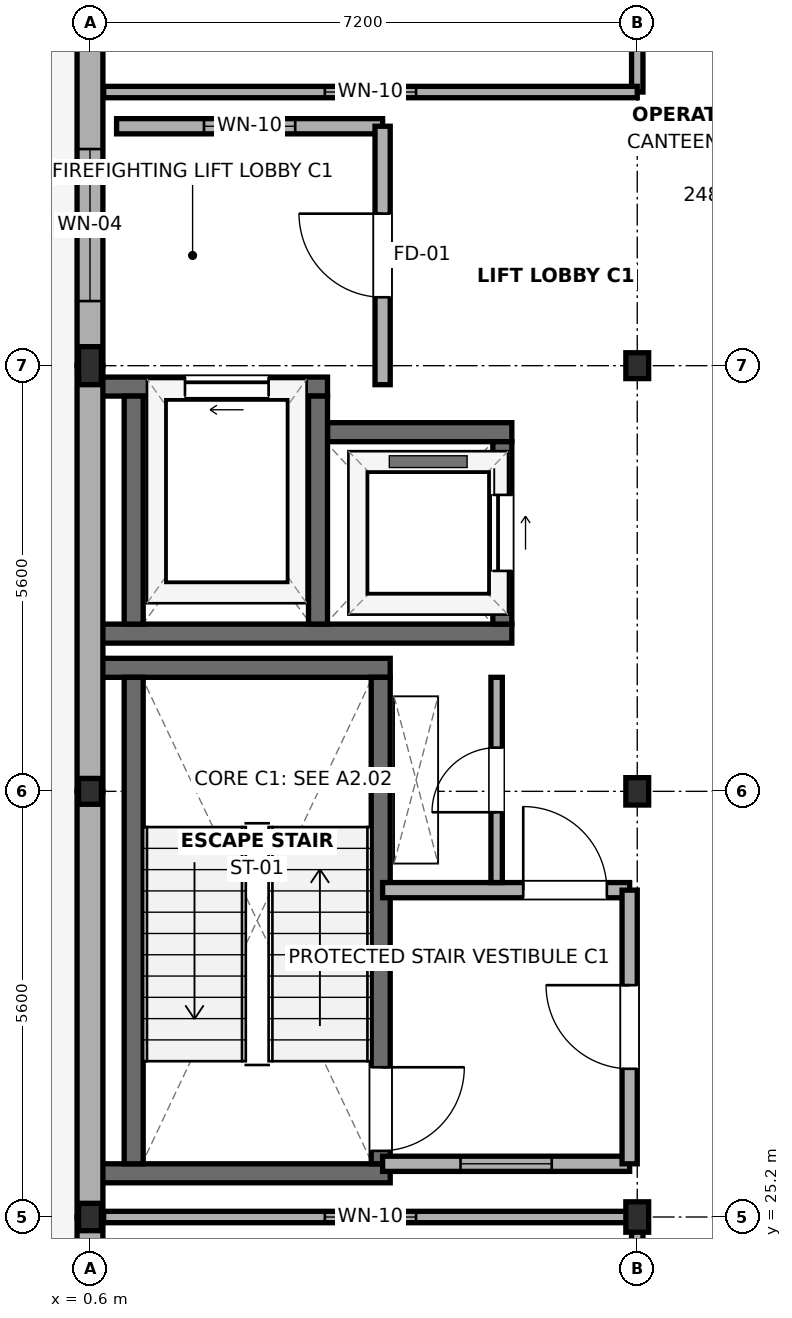
"""IFC4 building model, lengths in metres.
Left out: names, types, materials, properties, quantities, classifications, styles, units other than length and angle.
Written with IfcOpenShell. Run it as: python <this file> out.ifc"""

import sys

from ifc_helpers import new_model, si_unit, direction, frame, frame_2d, origin, origin_2d, place, context, subcontext, project, spatial, rectangle, i_section, extrude, element, fill, save


model = new_model("IFC4")
c1 = context("Model", 3, precision=1e-05, world=origin(), true_north=direction((0.0, 1.0)))
c2 = subcontext(c1, "Body", "Model", "MODEL_VIEW")
j1 = project(units=[si_unit("LENGTHUNIT", "METRE"), si_unit("PLANEANGLEUNIT", "RADIAN")], contexts=[c1])
p1 = place(None, origin())
s1 = spatial("IfcSite", under=j1, at=p1, CompositionType="ELEMENT")
p2 = place(p1, origin())
s2 = spatial("IfcBuilding", under=s1, at=p2, CompositionType="ELEMENT")
p3 = place(p2, frame((0.0, 0.0, 17.1)))
s3 = spatial("IfcBuildingStorey", under=s2, at=p3, CompositionType="ELEMENT", Elevation=17.1)
p4 = place(p3, frame((0.6, 25.2, 0.0), z_axis=(0.0, 0.0, 1.0), x_axis=(1.0, 0.0, 0.0)))
e1 = element("IfcColumn", 1, at=p4, inside=s3, PredefinedType="COLUMN", context=c2, shape_type="SweptSolid", body=[
    extrude(i_section(OverallWidth=0.3, OverallDepth=0.36, WebThickness=0.012, FlangeThickness=0.022, FilletRadius=0.027, at=origin_2d()), origin(), (0.0, 0.0, 1.0), 3.9),
])
p5 = place(p3, frame((0.6, 30.8, 0.0), z_axis=(0.0, 0.0, 1.0), x_axis=(1.0, 0.0, 0.0)))
e2 = element("IfcColumn", 2, at=p5, inside=s3, PredefinedType="COLUMN", context=c2, shape_type="SweptSolid", body=[
    extrude(i_section(OverallWidth=0.3, OverallDepth=0.34, WebThickness=0.012, FlangeThickness=0.021, FilletRadius=0.027, at=origin_2d()), origin(), (0.0, 0.0, 1.0), 3.9),
])
p6 = place(p3, frame((0.6, 36.4, 0.0), z_axis=(0.0, 0.0, 1.0), x_axis=(1.0, 0.0, 0.0)))
e3 = element("IfcColumn", 3, at=p6, inside=s3, PredefinedType="COLUMN", context=c2, shape_type="SweptSolid", body=[
    extrude(i_section(OverallWidth=0.3, OverallDepth=0.5, WebThickness=0.014, FlangeThickness=0.028, FilletRadius=0.027, at=origin_2d()), origin(), (0.0, 0.0, 1.0), 3.9),
])
p7 = place(p3, frame((7.8, 25.2, 0.0), z_axis=(0.0, 0.0, 1.0), x_axis=(1.0, 0.0, 0.0)))
e4 = element("IfcColumn", 4, at=p7, inside=s3, PredefinedType="COLUMN", context=c2, shape_type="SweptSolid", body=[
    extrude(i_section(OverallWidth=0.3, OverallDepth=0.4, WebThickness=0.013, FlangeThickness=0.024, FilletRadius=0.027, at=origin_2d()), origin(), (0.0, 0.0, 1.0), 3.9),
])
p8 = place(p3, frame((7.8, 30.8, 0.0), z_axis=(0.0, 0.0, 1.0), x_axis=(1.0, 0.0, 0.0)))
e5 = element("IfcColumn", 5, at=p8, inside=s3, PredefinedType="COLUMN", context=c2, shape_type="SweptSolid", body=[
    extrude(i_section(OverallWidth=0.3, OverallDepth=0.36, WebThickness=0.012, FlangeThickness=0.022, FilletRadius=0.027, at=origin_2d()), origin(), (0.0, 0.0, 1.0), 3.9),
])
p9 = place(p3, frame((7.8, 36.4, 0.0), z_axis=(0.0, 0.0, 1.0), x_axis=(1.0, 0.0, 0.0)))
e6 = element("IfcColumn", 6, at=p9, inside=s3, PredefinedType="COLUMN", context=c2, shape_type="SweptSolid", body=[
    extrude(i_section(OverallWidth=0.3, OverallDepth=0.34, WebThickness=0.012, FlangeThickness=0.021, FilletRadius=0.027, at=origin_2d()), origin(), (0.0, 0.0, 1.0), 3.9),
])
for number, where, z_axis, x_axis in (
    (7, (0.75, 25.775, 0.0), (0.0, 0.0, 1.0), (1.0, 0.0, 0.0)),
    (8, (0.75, 32.425, 0.0), (0.0, 0.0, 1.0), (1.0, 0.0, 0.0)),
):
    element("IfcWall", number, at=place(p3, frame(where, z_axis=z_axis, x_axis=x_axis)), inside=s3, PredefinedType="SHEAR", context=c2, shape_type="SweptSolid", body=[
        extrude(rectangle(XDim=3.8, YDim=0.25, at=frame_2d((1.9, 0.0))), origin(), (0.0, 0.0, 1.0), 3.7),
    ])
p10 = place(p3, frame((1.175, 25.9, 0.0), z_axis=(0.0, 0.0, 1.0), x_axis=(0.0, 1.0, 0.0)))
e9 = element("IfcWall", 9, at=p10, inside=s3, PredefinedType="SHEAR", context=c2, shape_type="SweptSolid", body=[
    extrude(rectangle(XDim=6.4, YDim=0.25, at=frame_2d((3.2, 0.0))), origin(), (0.0, 0.0, 1.0), 3.7),
])
p11 = place(p3, frame((4.425, 25.9, 0.0), z_axis=(0.0, 0.0, 1.0), x_axis=(0.0, 1.0, 0.0)))
e10 = element("IfcWall", 10, at=p11, inside=s3, PredefinedType="SHEAR", context=c2, shape_type="SweptSolid", body=[
    extrude(rectangle(XDim=6.4, YDim=0.25, at=frame_2d((3.2, 0.0))), origin(), (0.0, 0.0, 1.0), 3.7),
])
p12 = place(p11, frame((0.17, 0.0, 0.0)))
e11 = element("IfcOpeningElement", 11, at=p12, cuts=e10, PredefinedType="OPENING", context=c2, shape_type="SweptSolid", body=[
    extrude(rectangle(XDim=1.1, YDim=2.15, at=frame_2d((0.55, 1.075))), frame((0.0, 0.14, 0.0), z_axis=(0.0, -1.0, 0.0), x_axis=(1.0, 0.0, 0.0)), (0.0, 0.0, 1.0), 0.28),
])
p13 = place(p3, frame((0.75, 32.875, 0.0), z_axis=(0.0, 0.0, 1.0), x_axis=(1.0, 0.0, 0.0)))
e12 = element("IfcWall", 12, at=p13, inside=s3, PredefinedType="SHEAR", context=c2, shape_type="SweptSolid", body=[
    extrude(rectangle(XDim=5.4, YDim=0.25, at=frame_2d((2.7, 0.0))), origin(), (0.0, 0.0, 1.0), 3.7),
])
p14 = place(p3, frame((0.75, 36.125, 0.0), z_axis=(0.0, 0.0, 1.0), x_axis=(1.0, 0.0, 0.0)))
e13 = element("IfcWall", 13, at=p14, inside=s3, PredefinedType="SHEAR", context=c2, shape_type="SweptSolid", body=[
    extrude(rectangle(XDim=2.975, YDim=0.25, at=frame_2d((1.488, 0.0))), origin(), (0.0, 0.0, 1.0), 3.7),
])
p15 = place(p14, frame((1.1, 0.0, 0.0)))
e14 = element("IfcOpeningElement", 14, at=p15, cuts=e13, PredefinedType="OPENING", context=c2, shape_type="SweptSolid", body=[
    extrude(rectangle(XDim=1.1, YDim=2.15, at=frame_2d((0.55, 1.075))), frame((0.0, 0.14, 0.0), z_axis=(0.0, -1.0, 0.0), x_axis=(1.0, 0.0, 0.0)), (0.0, 0.0, 1.0), 0.28),
])
p16 = place(p3, frame((3.725, 35.525, 0.0), z_axis=(0.0, 0.0, 1.0), x_axis=(1.0, 0.0, 0.0)))
e15 = element("IfcWall", 15, at=p16, inside=s3, PredefinedType="SHEAR", context=c2, shape_type="SweptSolid", body=[
    extrude(rectangle(XDim=2.425, YDim=0.25, at=frame_2d((1.212, 0.0))), origin(), (0.0, 0.0, 1.0), 3.7),
])
for number, where, z_axis, x_axis in (
    (16, (1.175, 33.0, 0.0), (0.0, 0.0, 1.0), (0.0, 1.0, 0.0)),
    (17, (3.6, 33.0, 0.0), (0.0, 0.0, 1.0), (0.0, 1.0, 0.0)),
):
    element("IfcWall", number, at=place(p3, frame(where, z_axis=z_axis, x_axis=x_axis)), inside=s3, PredefinedType="SHEAR", context=c2, shape_type="SweptSolid", body=[
        extrude(rectangle(XDim=3.0, YDim=0.25, at=frame_2d((1.5, 0.0))), origin(), (0.0, 0.0, 1.0), 3.7),
    ])
p17 = place(p3, frame((6.025, 33.0, 0.0), z_axis=(0.0, 0.0, 1.0), x_axis=(0.0, 1.0, 0.0)))
e18 = element("IfcWall", 18, at=p17, inside=s3, PredefinedType="SHEAR", context=c2, shape_type="SweptSolid", body=[
    extrude(rectangle(XDim=2.4, YDim=0.25, at=frame_2d((1.2, 0.0))), origin(), (0.0, 0.0, 1.0), 3.7),
])
p18 = place(p17, frame((0.7, 0.0, 0.0)))
e19 = element("IfcOpeningElement", 19, at=p18, cuts=e18, PredefinedType="OPENING", context=c2, shape_type="SweptSolid", body=[
    extrude(rectangle(XDim=1.0, YDim=2.15, at=frame_2d((0.5, 1.075))), frame((0.0, 0.14, 0.0), z_axis=(0.0, -1.0, 0.0), x_axis=(1.0, 0.0, 0.0)), (0.0, 0.0, 1.0), 0.28),
])
p19 = place(p3, frame((0.6, 17.23, 0.0), z_axis=(0.0, 0.0, 1.0), x_axis=(0.0, 1.0, 0.0)))
e20 = element("IfcWall", 20, at=p19, inside=s3, PredefinedType="SOLIDWALL", context=c2, shape_type="SweptSolid", body=[
    extrude(rectangle(XDim=7.97, YDim=0.34, at=frame_2d((3.985, 0.0))), origin(), (0.0, 0.0, 1.0), 3.095),
])
p20 = place(p3, frame((0.6, 25.2, 0.0), z_axis=(0.0, 0.0, 1.0), x_axis=(0.0, 1.0, 0.0)))
e21 = element("IfcWall", 21, at=p20, inside=s3, PredefinedType="SOLIDWALL", context=c2, shape_type="SweptSolid", body=[
    extrude(rectangle(XDim=5.6, YDim=0.34, at=frame_2d((2.8, 0.0))), origin(), (0.0, 0.0, 1.0), 3.095),
])
p21 = place(p3, frame((0.6, 30.8, 0.0), z_axis=(0.0, 0.0, 1.0), x_axis=(0.0, 1.0, 0.0)))
e22 = element("IfcWall", 22, at=p21, inside=s3, PredefinedType="SOLIDWALL", context=c2, shape_type="SweptSolid", body=[
    extrude(rectangle(XDim=5.6, YDim=0.34, at=frame_2d((2.8, 0.0))), origin(), (0.0, 0.0, 1.0), 3.095),
])
p22 = place(p3, frame((0.6, 36.4, 0.0), z_axis=(0.0, 0.0, 1.0), x_axis=(0.0, 1.0, 0.0)))
e23 = element("IfcWall", 23, at=p22, inside=s3, PredefinedType="SOLIDWALL", context=c2, shape_type="SweptSolid", body=[
    extrude(rectangle(XDim=5.6, YDim=0.34, at=frame_2d((2.8, 0.0))), origin(), (0.0, 0.0, 1.0), 3.145),
])
p23 = place(p22, frame((0.85, 0.0, 0.9)))
e24 = element("IfcOpeningElement", 24, at=p23, cuts=e23, PredefinedType="OPENING", context=c2, shape_type="SweptSolid", body=[
    extrude(rectangle(XDim=2.0, YDim=1.8, at=frame_2d((1.0, 0.9))), frame((0.0, 0.185, 0.0), z_axis=(0.0, -1.0, 0.0), x_axis=(1.0, 0.0, 0.0)), (0.0, 0.0, 1.0), 0.37),
])
p24 = place(p3, frame((0.95, 39.55, 0.0), z_axis=(0.0, 0.0, 1.0), x_axis=(1.0, 0.0, 0.0)))
e25 = element("IfcWall", 25, at=p24, inside=s3, PredefinedType="PARTITIONING", context=c2, shape_type="SweptSolid", body=[
    extrude(rectangle(XDim=3.5, YDim=0.2, at=frame_2d((1.75, 0.0))), origin(), (0.0, 0.0, 1.0), 3.695),
])
p25 = place(p24, frame((1.15, 0.0, 0.95)))
e26 = element("IfcOpeningElement", 26, at=p25, cuts=e25, PredefinedType="OPENING", context=c2, shape_type="SweptSolid", body=[
    extrude(rectangle(XDim=1.2, YDim=1.5, at=frame_2d((0.6, 0.75))), frame((0.0, 0.115, 0.0), z_axis=(0.0, -1.0, 0.0), x_axis=(1.0, 0.0, 0.0)), (0.0, 0.0, 1.0), 0.23),
])
p26 = place(p3, frame((4.45, 36.15, 0.0), z_axis=(0.0, 0.0, 1.0), x_axis=(0.0, 1.0, 0.0)))
e27 = element("IfcWall", 27, at=p26, inside=s3, PredefinedType="PARTITIONING", context=c2, shape_type="SweptSolid", body=[
    extrude(rectangle(XDim=3.4, YDim=0.2, at=frame_2d((1.7, 0.0))), origin(), (0.0, 0.0, 1.0), 3.145),
])
p27 = place(p26, frame((1.15, 0.0, 0.0)))
e28 = element("IfcOpeningElement", 28, at=p27, cuts=e27, PredefinedType="OPENING", context=c2, shape_type="SweptSolid", body=[
    extrude(rectangle(XDim=1.1, YDim=2.15, at=frame_2d((0.55, 1.075))), frame((0.0, 0.115, 0.0), z_axis=(0.0, -1.0, 0.0), x_axis=(1.0, 0.0, 0.0)), (0.0, 0.0, 1.0), 0.23),
])
p28 = place(p3, frame((4.45, 25.9, 0.0), z_axis=(0.0, 0.0, 1.0), x_axis=(1.0, 0.0, 0.0)))
e29 = element("IfcWall", 29, at=p28, inside=s3, PredefinedType="PARTITIONING", context=c2, shape_type="SweptSolid", body=[
    extrude(rectangle(XDim=3.25, YDim=0.2, at=frame_2d((1.625, 0.0))), origin(), (0.0, 0.0, 1.0), 3.345),
])
p29 = place(p28, frame((1.025, 0.0, 0.95)))
e30 = element("IfcOpeningElement", 30, at=p29, cuts=e29, PredefinedType="OPENING", context=c2, shape_type="SweptSolid", body=[
    extrude(rectangle(XDim=1.2, YDim=1.5, at=frame_2d((0.6, 0.75))), frame((0.0, 0.115, 0.0), z_axis=(0.0, -1.0, 0.0), x_axis=(1.0, 0.0, 0.0)), (0.0, 0.0, 1.0), 0.23),
])
p30 = place(p3, frame((4.45, 29.5, 0.0), z_axis=(0.0, 0.0, 1.0), x_axis=(1.0, 0.0, 0.0)))
e31 = element("IfcWall", 31, at=p30, inside=s3, PredefinedType="PARTITIONING", context=c2, shape_type="SweptSolid", body=[
    extrude(rectangle(XDim=3.25, YDim=0.2, at=frame_2d((1.625, 0.0))), origin(), (0.0, 0.0, 1.0), 3.345),
])
p31 = place(p30, frame((1.85, 0.0, 0.0)))
e32 = element("IfcOpeningElement", 32, at=p31, cuts=e31, PredefinedType="OPENING", context=c2, shape_type="SweptSolid", body=[
    extrude(rectangle(XDim=1.1, YDim=2.15, at=frame_2d((0.55, 1.075))), frame((0.0, 0.115, 0.0), z_axis=(0.0, -1.0, 0.0), x_axis=(1.0, 0.0, 0.0)), (0.0, 0.0, 1.0), 0.23),
])
p32 = place(p3, frame((7.7, 25.9, 0.0), z_axis=(0.0, 0.0, 1.0), x_axis=(0.0, 1.0, 0.0)))
e33 = element("IfcWall", 33, at=p32, inside=s3, PredefinedType="PARTITIONING", context=c2, shape_type="SweptSolid", body=[
    extrude(rectangle(XDim=3.6, YDim=0.2, at=frame_2d((1.8, 0.0))), origin(), (0.0, 0.0, 1.0), 3.345),
])
p33 = place(p32, frame((1.25, 0.0, 0.0)))
e34 = element("IfcOpeningElement", 34, at=p33, cuts=e33, PredefinedType="OPENING", context=c2, shape_type="SweptSolid", body=[
    extrude(rectangle(XDim=1.1, YDim=2.15, at=frame_2d((0.55, 1.075))), frame((0.0, 0.115, 0.0), z_axis=(0.0, -1.0, 0.0), x_axis=(1.0, 0.0, 0.0)), (0.0, 0.0, 1.0), 0.23),
])
p34 = place(p3, frame((5.95, 29.6, 0.0), z_axis=(0.0, 0.0, 1.0), x_axis=(0.0, 1.0, 0.0)))
e35 = element("IfcWall", 35, at=p34, inside=s3, PredefinedType="PARTITIONING", context=c2, shape_type="SweptSolid", body=[
    extrude(rectangle(XDim=2.7, YDim=0.15, at=frame_2d((1.35, 0.0))), origin(), (0.0, 0.0, 1.0), 3.695),
])
p35 = place(p34, frame((0.925, 0.0, 0.0)))
e36 = element("IfcOpeningElement", 36, at=p35, cuts=e35, PredefinedType="OPENING", context=c2, shape_type="SweptSolid", body=[
    extrude(rectangle(XDim=0.85, YDim=2.1, at=frame_2d((0.425, 1.05))), frame((0.0, 0.09, 0.0), z_axis=(0.0, -1.0, 0.0), x_axis=(1.0, 0.0, 0.0)), (0.0, 0.0, 1.0), 0.18),
])
p36 = place(p3, frame((7.8, 17.56, 0.0), z_axis=(0.0, 0.0, 1.0), x_axis=(0.0, 1.0, 0.0)))
e37 = element("IfcWall", 37, at=p36, inside=s3, PredefinedType="PARTITIONING", context=c2, shape_type="SweptSolid", body=[
    extrude(rectangle(XDim=7.64, YDim=0.15, at=frame_2d((3.82, 0.0))), origin(), (0.0, 0.0, 1.0), 3.095),
])
p37 = place(p36, frame((3.295, 0.0, 0.0)))
e38 = element("IfcOpeningElement", 38, at=p37, cuts=e37, PredefinedType="OPENING", context=c2, shape_type="SweptSolid", body=[
    extrude(rectangle(XDim=1.05, YDim=2.15, at=frame_2d((0.525, 1.075))), frame((0.0, 0.09, 0.0), z_axis=(0.0, -1.0, 0.0), x_axis=(1.0, 0.0, 0.0)), (0.0, 0.0, 1.0), 0.18),
])
p38 = place(p3, frame((0.78, 25.2, 0.0), z_axis=(0.0, 0.0, 1.0), x_axis=(1.0, 0.0, 0.0)))
e39 = element("IfcWall", 39, at=p38, inside=s3, PredefinedType="PARTITIONING", context=c2, shape_type="SweptSolid", body=[
    extrude(rectangle(XDim=7.02, YDim=0.15, at=frame_2d((3.51, 0.0))), origin(), (0.0, 0.0, 1.0), 3.195),
])
p39 = place(p38, frame((2.91, 0.0, 0.95)))
e40 = element("IfcOpeningElement", 40, at=p39, cuts=e39, PredefinedType="OPENING", context=c2, shape_type="SweptSolid", body=[
    extrude(rectangle(XDim=1.2, YDim=1.5, at=frame_2d((0.6, 0.75))), frame((0.0, 0.09, 0.0), z_axis=(0.0, -1.0, 0.0), x_axis=(1.0, 0.0, 0.0)), (0.0, 0.0, 1.0), 0.18),
])
p40 = place(p3, frame((7.8, 40.0, 0.0), z_axis=(0.0, 0.0, 1.0), x_axis=(0.0, 1.0, 0.0)))
e41 = element("IfcWall", 41, at=p40, inside=s3, PredefinedType="PARTITIONING", context=c2, shape_type="SweptSolid", body=[
    extrude(rectangle(XDim=18.8, YDim=0.15, at=frame_2d((9.4, 0.0))), origin(), (0.0, 0.0, 1.0), 3.095),
])
p41 = place(p40, frame((8.65, 0.0, 0.0)))
e42 = element("IfcOpeningElement", 42, at=p41, cuts=e41, PredefinedType="OPENING", context=c2, shape_type="SweptSolid", body=[
    extrude(rectangle(XDim=1.5, YDim=2.15, at=frame_2d((0.75, 1.075))), frame((0.0, 0.09, 0.0), z_axis=(0.0, -1.0, 0.0), x_axis=(1.0, 0.0, 0.0)), (0.0, 0.0, 1.0), 0.18),
])
p42 = place(p40, frame((3.4, 0.0, 0.95)))
e43 = element("IfcOpeningElement", 43, at=p42, cuts=e41, PredefinedType="OPENING", context=c2, shape_type="SweptSolid", body=[
    extrude(rectangle(XDim=2.6, YDim=1.5, at=frame_2d((1.3, 0.75))), frame((0.0, 0.09, 0.0), z_axis=(0.0, -1.0, 0.0), x_axis=(1.0, 0.0, 0.0)), (0.0, 0.0, 1.0), 0.18),
])
p43 = place(p3, frame((0.78, 40.0, 0.0), z_axis=(0.0, 0.0, 1.0), x_axis=(1.0, 0.0, 0.0)))
e44 = element("IfcWall", 44, at=p43, inside=s3, PredefinedType="PARTITIONING", context=c2, shape_type="SweptSolid", body=[
    extrude(rectangle(XDim=7.02, YDim=0.15, at=frame_2d((3.51, 0.0))), origin(), (0.0, 0.0, 1.0), 3.095),
])
p44 = place(p43, frame((2.91, 0.0, 0.95)))
e45 = element("IfcOpeningElement", 45, at=p44, cuts=e44, PredefinedType="OPENING", context=c2, shape_type="SweptSolid", body=[
    extrude(rectangle(XDim=1.2, YDim=1.5, at=frame_2d((0.6, 0.75))), frame((0.0, 0.09, 0.0), z_axis=(0.0, -1.0, 0.0), x_axis=(1.0, 0.0, 0.0)), (0.0, 0.0, 1.0), 0.18),
])
p45 = place(p23, origin())
e46 = element("IfcWindow", 46, at=p45, inside=s3, PartitioningType="SINGLE_PANEL", PredefinedType="WINDOW", context=c2, shape_type="SweptSolid", body=[
    extrude(rectangle(XDim=2.0, YDim=1.8, at=frame_2d((1.0, 0.9))), frame((0.0, 0.03, 0.0), z_axis=(0.0, -1.0, 0.0), x_axis=(1.0, 0.0, 0.0)), (0.0, 0.0, 1.0), 0.06),
])
fill(e24, e46)
p46 = place(p12, frame((1.1, 0.0, 0.0), z_axis=(0.0, 0.0, 1.0), x_axis=(-1.0, 0.0, 0.0)))
e47 = element("IfcDoor", 47, at=p46, inside=s3, OperationType="SINGLE_SWING_LEFT", PredefinedType="DOOR", context=c2, shape_type="SweptSolid", body=[
    extrude(rectangle(XDim=1.1, YDim=2.15, at=frame_2d((0.55, 1.075))), frame((0.0, 0.025, 0.0), z_axis=(0.0, -1.0, 0.0), x_axis=(1.0, 0.0, 0.0)), (0.0, 0.0, 1.0), 0.05),
])
fill(e11, e47)
p47 = place(p15, origin())
e48 = element("IfcDoor", 48, at=p47, inside=s3, OperationType="SLIDING_TO_LEFT", PredefinedType="DOOR", context=c2, shape_type="SweptSolid", body=[
    extrude(rectangle(XDim=1.1, YDim=2.15, at=frame_2d((0.55, 1.075))), frame((0.0, 0.025, 0.0), z_axis=(0.0, -1.0, 0.0), x_axis=(1.0, 0.0, 0.0)), (0.0, 0.0, 1.0), 0.05),
])
fill(e14, e48)
p48 = place(p18, frame((1.0, 0.0, 0.0), z_axis=(0.0, 0.0, 1.0), x_axis=(-1.0, 0.0, 0.0)))
e49 = element("IfcDoor", 49, at=p48, inside=s3, OperationType="SLIDING_TO_RIGHT", PredefinedType="DOOR", context=c2, shape_type="SweptSolid", body=[
    extrude(rectangle(XDim=1.0, YDim=2.15, at=frame_2d((0.5, 1.075))), frame((0.0, 0.025, 0.0), z_axis=(0.0, -1.0, 0.0), x_axis=(1.0, 0.0, 0.0)), (0.0, 0.0, 1.0), 0.05),
])
fill(e19, e49)
p49 = place(p25, origin())
e50 = element("IfcWindow", 50, at=p49, inside=s3, PartitioningType="SINGLE_PANEL", PredefinedType="WINDOW", context=c2, shape_type="SweptSolid", body=[
    extrude(rectangle(XDim=1.2, YDim=1.5, at=frame_2d((0.6, 0.75))), frame((0.0, 0.03, 0.0), z_axis=(0.0, -1.0, 0.0), x_axis=(1.0, 0.0, 0.0)), (0.0, 0.0, 1.0), 0.06),
])
fill(e26, e50)
p50 = place(p27, origin())
e51 = element("IfcDoor", 51, at=p50, inside=s3, OperationType="SINGLE_SWING_RIGHT", PredefinedType="DOOR", context=c2, shape_type="SweptSolid", body=[
    extrude(rectangle(XDim=1.1, YDim=2.15, at=frame_2d((0.55, 1.075))), frame((0.0, 0.025, 0.0), z_axis=(0.0, -1.0, 0.0), x_axis=(1.0, 0.0, 0.0)), (0.0, 0.0, 1.0), 0.05),
])
fill(e28, e51)
p51 = place(p29, origin())
e52 = element("IfcWindow", 52, at=p51, inside=s3, PartitioningType="SINGLE_PANEL", PredefinedType="WINDOW", context=c2, shape_type="SweptSolid", body=[
    extrude(rectangle(XDim=1.2, YDim=1.5, at=frame_2d((0.6, 0.75))), frame((0.0, 0.03, 0.0), z_axis=(0.0, -1.0, 0.0), x_axis=(1.0, 0.0, 0.0)), (0.0, 0.0, 1.0), 0.06),
])
fill(e30, e52)
p52 = place(p31, origin())
e53 = element("IfcDoor", 53, at=p52, inside=s3, OperationType="SINGLE_SWING_LEFT", PredefinedType="DOOR", context=c2, shape_type="SweptSolid", body=[
    extrude(rectangle(XDim=1.1, YDim=2.15, at=frame_2d((0.55, 1.075))), frame((0.0, 0.025, 0.0), z_axis=(0.0, -1.0, 0.0), x_axis=(1.0, 0.0, 0.0)), (0.0, 0.0, 1.0), 0.05),
])
fill(e32, e53)
p53 = place(p33, origin())
e54 = element("IfcDoor", 54, at=p53, inside=s3, OperationType="SINGLE_SWING_RIGHT", PredefinedType="DOOR", context=c2, shape_type="SweptSolid", body=[
    extrude(rectangle(XDim=1.1, YDim=2.15, at=frame_2d((0.55, 1.075))), frame((0.0, 0.025, 0.0), z_axis=(0.0, -1.0, 0.0), x_axis=(1.0, 0.0, 0.0)), (0.0, 0.0, 1.0), 0.05),
])
fill(e34, e54)
p54 = place(p35, origin())
e55 = element("IfcDoor", 55, at=p54, inside=s3, OperationType="SINGLE_SWING_LEFT", PredefinedType="DOOR", context=c2, shape_type="SweptSolid", body=[
    extrude(rectangle(XDim=0.85, YDim=2.1, at=frame_2d((0.425, 1.05))), frame((0.0, 0.025, 0.0), z_axis=(0.0, -1.0, 0.0), x_axis=(1.0, 0.0, 0.0)), (0.0, 0.0, 1.0), 0.05),
])
fill(e36, e55)
p55 = place(p39, origin())
e56 = element("IfcWindow", 56, at=p55, inside=s3, PartitioningType="SINGLE_PANEL", PredefinedType="WINDOW", context=c2, shape_type="SweptSolid", body=[
    extrude(rectangle(XDim=1.2, YDim=1.5, at=frame_2d((0.6, 0.75))), frame((0.0, 0.03, 0.0), z_axis=(0.0, -1.0, 0.0), x_axis=(1.0, 0.0, 0.0)), (0.0, 0.0, 1.0), 0.06),
])
fill(e40, e56)
p56 = place(p44, origin())
e57 = element("IfcWindow", 57, at=p56, inside=s3, PartitioningType="SINGLE_PANEL", PredefinedType="WINDOW", context=c2, shape_type="SweptSolid", body=[
    extrude(rectangle(XDim=1.2, YDim=1.5, at=frame_2d((0.6, 0.75))), frame((0.0, 0.03, 0.0), z_axis=(0.0, -1.0, 0.0), x_axis=(1.0, 0.0, 0.0)), (0.0, 0.0, 1.0), 0.06),
])
fill(e45, e57)
save(model, sys.argv[1])
